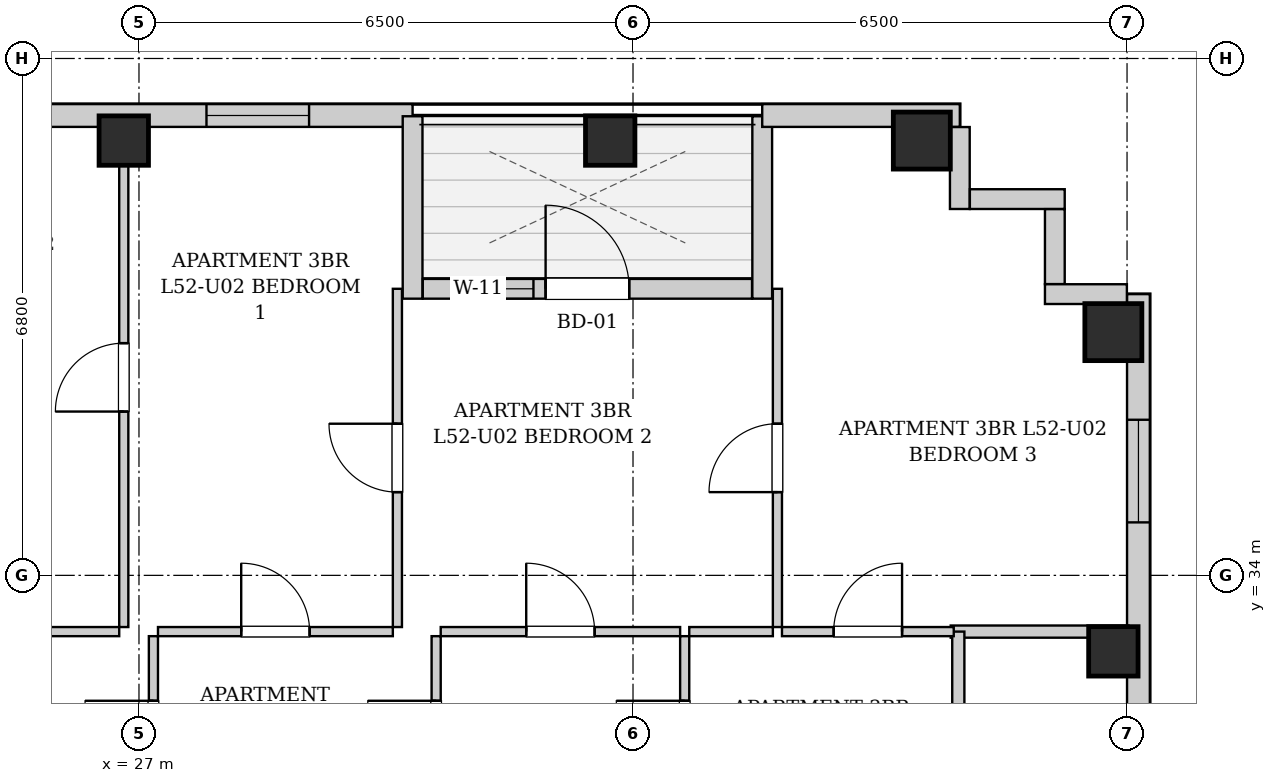
"""IFC4 building model, lengths in metres.
Left out: names, types, materials, properties, quantities, classifications, styles, units other than length and angle.
Written with IfcOpenShell. Run it as: python <this file> out.ifc"""

import sys

from ifc_helpers import new_model, si_unit, direction, frame, frame_2d, origin, origin_2d, place, context, subcontext, project, spatial, rectangle, extrude, element, fill, save


model = new_model("IFC4")
c1 = context("Model", 3, precision=1e-05, world=origin(), true_north=direction((0.0, 1.0)))
c2 = subcontext(c1, "Body", "Model", "MODEL_VIEW")
j1 = project(units=[si_unit("LENGTHUNIT", "METRE"), si_unit("PLANEANGLEUNIT", "RADIAN")], contexts=[c1])
p1 = place(None, origin())
s1 = spatial("IfcSite", under=j1, at=p1, CompositionType="ELEMENT")
p2 = place(p1, origin())
s2 = spatial("IfcBuilding", under=s1, at=p2, CompositionType="ELEMENT")
p3 = place(p2, frame((0.0, 0.0, 181.0)))
s3 = spatial("IfcBuildingStorey", under=s2, at=p3, CompositionType="ELEMENT", Elevation=181.0)
for number, where, z_axis, x_axis in (
    (1, (26.8, 39.72, 0.0), (0.0, 0.0, 1.0), (1.0, 0.0, 0.0)),
    (2, (33.2, 39.72, 0.0), (0.0, 0.0, 1.0), (1.0, 0.0, 0.0)),
):
    element("IfcColumn", number, at=place(p3, frame(where, z_axis=z_axis, x_axis=x_axis)), inside=s3, PredefinedType="COLUMN", context=c2, shape_type="SweptSolid", body=[
        extrude(rectangle(XDim=0.65, YDim=0.65, at=origin_2d()), origin(), (0.0, 0.0, 1.0), 3.3),
    ])
p4 = place(p3, frame((37.3, 39.72, 0.0), z_axis=(0.0, 0.0, 1.0), x_axis=(1.0, 0.0, 0.0)))
e3 = element("IfcColumn", 3, at=p4, inside=s3, PredefinedType="COLUMN", context=c2, shape_type="SweptSolid", body=[
    extrude(rectangle(XDim=0.75, YDim=0.75, at=origin_2d()), origin(), (0.0, 0.0, 1.0), 3.3),
])
p5 = place(p3, frame((39.82, 33.0, 0.0), z_axis=(0.0, 0.0, 1.0), x_axis=(1.0, 0.0, 0.0)))
e4 = element("IfcColumn", 4, at=p5, inside=s3, PredefinedType="COLUMN", context=c2, shape_type="SweptSolid", body=[
    extrude(rectangle(XDim=0.65, YDim=0.65, at=origin_2d()), origin(), (0.0, 0.0, 1.0), 3.3),
])
p6 = place(p3, frame((39.82, 37.2, 0.0), z_axis=(0.0, 0.0, 1.0), x_axis=(1.0, 0.0, 0.0)))
e5 = element("IfcColumn", 5, at=p6, inside=s3, PredefinedType="COLUMN", context=c2, shape_type="SweptSolid", body=[
    extrude(rectangle(XDim=0.75, YDim=0.75, at=origin_2d()), origin(), (0.0, 0.0, 1.0), 3.3),
])
p7 = place(p3, frame((13.1, 40.05, 0.0), z_axis=(0.0, 0.0, 1.0), x_axis=(1.0, 0.0, 0.0)))
e6 = element("IfcWall", 6, at=p7, inside=s3, PredefinedType="SOLIDWALL", context=c2, shape_type="SweptSolid", body=[
    extrude(rectangle(XDim=17.5, YDim=0.3, at=frame_2d((8.75, 0.0))), origin(), (0.0, 0.0, 1.0), 3.04),
])
p8 = place(p7, frame((1.815, 0.0, 0.55)))
e7 = element("IfcOpeningElement", 7, at=p8, cuts=e6, PredefinedType="OPENING", context=c2, shape_type="SweptSolid", body=[
    extrude(rectangle(XDim=1.35, YDim=1.2, at=frame_2d((0.675, 0.6))), frame((0.0, 0.16, 0.0), z_axis=(0.0, -1.0, 0.0), x_axis=(1.0, 0.0, 0.0)), (0.0, 0.0, 1.0), 0.32),
])
p9 = place(p7, frame((6.189, 0.0, 0.55)))
e8 = element("IfcOpeningElement", 8, at=p9, cuts=e6, PredefinedType="OPENING", context=c2, shape_type="SweptSolid", body=[
    extrude(rectangle(XDim=1.35, YDim=1.2, at=frame_2d((0.675, 0.6))), frame((0.0, 0.16, 0.0), z_axis=(0.0, -1.0, 0.0), x_axis=(1.0, 0.0, 0.0)), (0.0, 0.0, 1.0), 0.32),
])
p10 = place(p7, frame((14.788, 0.0, 0.55)))
e9 = element("IfcOpeningElement", 9, at=p10, cuts=e6, PredefinedType="OPENING", context=c2, shape_type="SweptSolid", body=[
    extrude(rectangle(XDim=1.35, YDim=1.2, at=frame_2d((0.675, 0.6))), frame((0.0, 0.16, 0.0), z_axis=(0.0, -1.0, 0.0), x_axis=(1.0, 0.0, 0.0)), (0.0, 0.0, 1.0), 0.32),
])
p11 = place(p3, frame((30.6, 40.04, 0.0), z_axis=(0.0, 0.0, 1.0), x_axis=(0.0, -1.0, 0.0)))
e10 = element("IfcWall", 10, at=p11, inside=s3, PredefinedType="SOLIDWALL", context=c2, shape_type="SweptSolid", body=[
    extrude(rectangle(XDim=2.4, YDim=0.26, at=frame_2d((1.2, 0.0))), origin(), (0.0, 0.0, 1.0), 3.04),
])
p12 = place(p3, frame((30.734, 37.77, 0.0), z_axis=(0.0, 0.0, 1.0), x_axis=(1.0, 0.0, 0.0)))
e11 = element("IfcWall", 11, at=p12, inside=s3, PredefinedType="SOLIDWALL", context=c2, shape_type="SweptSolid", body=[
    extrude(rectangle(XDim=4.332, YDim=0.26, at=frame_2d((2.166, 0.0))), origin(), (0.0, 0.0, 1.0), 3.04),
])
p13 = place(p12, frame((1.616, 0.0, 0.0)))
e12 = element("IfcOpeningElement", 12, at=p13, cuts=e11, PredefinedType="OPENING", context=c2, shape_type="SweptSolid", body=[
    extrude(rectangle(XDim=1.1, YDim=2.0, at=frame_2d((0.55, 1.0))), frame((0.0, 0.14, 0.0), z_axis=(0.0, -1.0, 0.0), x_axis=(1.0, 0.0, 0.0)), (0.0, 0.0, 1.0), 0.28),
])
p14 = place(p12, frame((0.606, 0.0, 0.55)))
e13 = element("IfcOpeningElement", 13, at=p14, cuts=e11, PredefinedType="OPENING", context=c2, shape_type="SweptSolid", body=[
    extrude(rectangle(XDim=0.85, YDim=1.2, at=frame_2d((0.425, 0.6))), frame((0.0, 0.14, 0.0), z_axis=(0.0, -1.0, 0.0), x_axis=(1.0, 0.0, 0.0)), (0.0, 0.0, 1.0), 0.28),
])
p15 = place(p3, frame((35.2, 37.64, 0.0), z_axis=(0.0, 0.0, 1.0), x_axis=(0.0, 1.0, 0.0)))
e14 = element("IfcWall", 14, at=p15, inside=s3, PredefinedType="SOLIDWALL", context=c2, shape_type="SweptSolid", body=[
    extrude(rectangle(XDim=2.4, YDim=0.26, at=frame_2d((1.2, 0.0))), origin(), (0.0, 0.0, 1.0), 3.04),
])
p16 = place(p3, frame((35.2, 40.05, 0.0), z_axis=(0.0, 0.0, 1.0), x_axis=(1.0, 0.0, 0.0)))
e15 = element("IfcWall", 15, at=p16, inside=s3, PredefinedType="SOLIDWALL", context=c2, shape_type="SweptSolid", body=[
    extrude(rectangle(XDim=2.6, YDim=0.3, at=frame_2d((1.3, 0.0))), origin(), (0.0, 0.0, 1.0), 3.04),
])
p17 = place(p3, frame((40.15, 37.7, 0.0), z_axis=(0.0, 0.0, 1.0), x_axis=(0.0, -1.0, 0.0)))
e16 = element("IfcWall", 16, at=p17, inside=s3, PredefinedType="SOLIDWALL", context=c2, shape_type="SweptSolid", body=[
    extrude(rectangle(XDim=31.4, YDim=0.3, at=frame_2d((15.7, 0.0))), origin(), (0.0, 0.0, 1.0), 3.04),
])
p18 = place(p17, frame((28.396, 0.0, 0.55)))
e17 = element("IfcOpeningElement", 17, at=p18, cuts=e16, PredefinedType="OPENING", context=c2, shape_type="SweptSolid", body=[
    extrude(rectangle(XDim=1.35, YDim=1.2, at=frame_2d((0.675, 0.6))), frame((0.0, 0.16, 0.0), z_axis=(0.0, -1.0, 0.0), x_axis=(1.0, 0.0, 0.0)), (0.0, 0.0, 1.0), 0.32),
])
p19 = place(p17, frame((1.653, 0.0, 0.55)))
e18 = element("IfcOpeningElement", 18, at=p19, cuts=e16, PredefinedType="OPENING", context=c2, shape_type="SweptSolid", body=[
    extrude(rectangle(XDim=1.35, YDim=1.2, at=frame_2d((0.675, 0.6))), frame((0.0, 0.16, 0.0), z_axis=(0.0, -1.0, 0.0), x_axis=(1.0, 0.0, 0.0)), (0.0, 0.0, 1.0), 0.32),
])
p20 = place(p17, frame((19.683, 0.0, 0.55)))
e19 = element("IfcOpeningElement", 19, at=p20, cuts=e16, PredefinedType="OPENING", context=c2, shape_type="SweptSolid", body=[
    extrude(rectangle(XDim=1.35, YDim=1.2, at=frame_2d((0.675, 0.6))), frame((0.0, 0.16, 0.0), z_axis=(0.0, -1.0, 0.0), x_axis=(1.0, 0.0, 0.0)), (0.0, 0.0, 1.0), 0.32),
])
p21 = place(p17, frame((10.367, 0.0, 0.55)))
e20 = element("IfcOpeningElement", 20, at=p21, cuts=e16, PredefinedType="OPENING", context=c2, shape_type="SweptSolid", body=[
    extrude(rectangle(XDim=1.35, YDim=1.2, at=frame_2d((0.675, 0.6))), frame((0.0, 0.16, 0.0), z_axis=(0.0, -1.0, 0.0), x_axis=(1.0, 0.0, 0.0)), (0.0, 0.0, 1.0), 0.32),
])
p22 = place(p3, frame((37.8, 39.898, 0.0), z_axis=(0.0, 0.0, 1.0), x_axis=(0.0, -1.0, 0.0)))
e21 = element("IfcWall", 21, at=p22, inside=s3, PredefinedType="SOLIDWALL", context=c2, shape_type="SweptSolid", body=[
    extrude(rectangle(XDim=1.078, YDim=0.26, at=frame_2d((0.539, 0.0))), origin(), (0.0, 0.0, 1.0), 3.04),
])
p23 = place(p3, frame((37.932, 38.95, 0.0), z_axis=(0.0, 0.0, 1.0), x_axis=(1.0, 0.0, 0.0)))
e22 = element("IfcWall", 22, at=p23, inside=s3, PredefinedType="SOLIDWALL", context=c2, shape_type="SweptSolid", body=[
    extrude(rectangle(XDim=1.248, YDim=0.26, at=frame_2d((0.624, 0.0))), origin(), (0.0, 0.0, 1.0), 3.04),
])
p24 = place(p3, frame((39.05, 38.818, 0.0), z_axis=(0.0, 0.0, 1.0), x_axis=(0.0, -1.0, 0.0)))
e23 = element("IfcWall", 23, at=p24, inside=s3, PredefinedType="SOLIDWALL", context=c2, shape_type="SweptSolid", body=[
    extrude(rectangle(XDim=0.986, YDim=0.26, at=frame_2d((0.493, 0.0))), origin(), (0.0, 0.0, 1.0), 3.04),
])
p25 = place(p3, frame((38.92, 37.7, 0.0), z_axis=(0.0, 0.0, 1.0), x_axis=(1.0, 0.0, 0.0)))
e24 = element("IfcWall", 24, at=p25, inside=s3, PredefinedType="SOLIDWALL", context=c2, shape_type="SweptSolid", body=[
    extrude(rectangle(XDim=1.078, YDim=0.26, at=frame_2d((0.539, 0.0))), origin(), (0.0, 0.0, 1.0), 3.04),
])
p26 = place(p3, frame((37.68, 33.26, 0.0), z_axis=(0.0, 0.0, 1.0), x_axis=(1.0, 0.0, 0.0)))
e25 = element("IfcWall", 25, at=p26, inside=s3, PredefinedType="PARTITIONING", context=c2, shape_type="SweptSolid", body=[
    extrude(rectangle(XDim=2.34, YDim=0.16, at=frame_2d((1.17, 0.0))), origin(), (0.0, 0.0, 1.0), 3.04),
])
p27 = place(p3, frame((37.78, 30.6, 0.0), z_axis=(0.0, 0.0, 1.0), x_axis=(0.0, 1.0, 0.0)))
e26 = element("IfcWall", 26, at=p27, inside=s3, PredefinedType="PARTITIONING", context=c2, shape_type="SweptSolid", body=[
    extrude(rectangle(XDim=2.66, YDim=0.16, at=frame_2d((1.33, 0.0))), origin(), (0.0, 0.0, 1.0), 3.04),
])
p28 = place(p3, frame((27.19, 30.6, 0.0), z_axis=(0.0, 0.0, 1.0), x_axis=(0.0, 1.0, 0.0)))
e27 = element("IfcWall", 27, at=p28, inside=s3, PredefinedType="PARTITIONING", context=c2, shape_type="SweptSolid", body=[
    extrude(rectangle(XDim=2.6, YDim=0.12, at=frame_2d((1.3, 0.0))), origin(), (0.0, 0.0, 1.0), 3.04),
])
p29 = place(p28, frame((0.85, 0.0, 0.0)))
e28 = element("IfcOpeningElement", 28, at=p29, cuts=e27, PredefinedType="OPENING", context=c2, shape_type="SweptSolid", body=[
    extrude(rectangle(XDim=0.9, YDim=2.05, at=frame_2d((0.45, 1.025))), frame((0.0, 0.07, 0.0), z_axis=(0.0, -1.0, 0.0), x_axis=(1.0, 0.0, 0.0)), (0.0, 0.0, 1.0), 0.14),
])
p30 = place(p3, frame((23.98, 33.26, 0.0), z_axis=(0.0, 0.0, 1.0), x_axis=(1.0, 0.0, 0.0)))
e29 = element("IfcWall", 29, at=p30, inside=s3, PredefinedType="PARTITIONING", context=c2, shape_type="SweptSolid", body=[
    extrude(rectangle(XDim=2.76, YDim=0.12, at=frame_2d((1.38, 0.0))), origin(), (0.0, 0.0, 1.0), 3.04),
])
p31 = place(p30, frame((0.93, 0.0, 0.0)))
e30 = element("IfcOpeningElement", 30, at=p31, cuts=e29, PredefinedType="OPENING", context=c2, shape_type="SweptSolid", body=[
    extrude(rectangle(XDim=0.9, YDim=2.05, at=frame_2d((0.45, 1.025))), frame((0.0, 0.07, 0.0), z_axis=(0.0, -1.0, 0.0), x_axis=(1.0, 0.0, 0.0)), (0.0, 0.0, 1.0), 0.14),
])
p32 = place(p3, frame((30.91, 30.6, 0.0), z_axis=(0.0, 0.0, 1.0), x_axis=(0.0, 1.0, 0.0)))
e31 = element("IfcWall", 31, at=p32, inside=s3, PredefinedType="PARTITIONING", context=c2, shape_type="SweptSolid", body=[
    extrude(rectangle(XDim=2.6, YDim=0.12, at=frame_2d((1.3, 0.0))), origin(), (0.0, 0.0, 1.0), 3.04),
])
p33 = place(p32, frame((0.85, 0.0, 0.0)))
e32 = element("IfcOpeningElement", 32, at=p33, cuts=e31, PredefinedType="OPENING", context=c2, shape_type="SweptSolid", body=[
    extrude(rectangle(XDim=0.9, YDim=2.05, at=frame_2d((0.45, 1.025))), frame((0.0, 0.07, 0.0), z_axis=(0.0, -1.0, 0.0), x_axis=(1.0, 0.0, 0.0)), (0.0, 0.0, 1.0), 0.14),
])
p34 = place(p3, frame((27.25, 33.26, 0.0), z_axis=(0.0, 0.0, 1.0), x_axis=(1.0, 0.0, 0.0)))
e33 = element("IfcWall", 33, at=p34, inside=s3, PredefinedType="PARTITIONING", context=c2, shape_type="SweptSolid", body=[
    extrude(rectangle(XDim=3.09, YDim=0.12, at=frame_2d((1.545, 0.0))), origin(), (0.0, 0.0, 1.0), 3.04),
])
p35 = place(p34, frame((1.095, 0.0, 0.0)))
e34 = element("IfcOpeningElement", 34, at=p35, cuts=e33, PredefinedType="OPENING", context=c2, shape_type="SweptSolid", body=[
    extrude(rectangle(XDim=0.9, YDim=2.05, at=frame_2d((0.45, 1.025))), frame((0.0, 0.07, 0.0), z_axis=(0.0, -1.0, 0.0), x_axis=(1.0, 0.0, 0.0)), (0.0, 0.0, 1.0), 0.14),
])
p36 = place(p3, frame((34.18, 30.6, 0.0), z_axis=(0.0, 0.0, 1.0), x_axis=(0.0, 1.0, 0.0)))
e35 = element("IfcWall", 35, at=p36, inside=s3, PredefinedType="PARTITIONING", context=c2, shape_type="SweptSolid", body=[
    extrude(rectangle(XDim=2.6, YDim=0.12, at=frame_2d((1.3, 0.0))), origin(), (0.0, 0.0, 1.0), 3.04),
])
p37 = place(p36, frame((0.85, 0.0, 0.0)))
e36 = element("IfcOpeningElement", 36, at=p37, cuts=e35, PredefinedType="OPENING", context=c2, shape_type="SweptSolid", body=[
    extrude(rectangle(XDim=0.9, YDim=2.05, at=frame_2d((0.45, 1.025))), frame((0.0, 0.07, 0.0), z_axis=(0.0, -1.0, 0.0), x_axis=(1.0, 0.0, 0.0)), (0.0, 0.0, 1.0), 0.14),
])
p38 = place(p3, frame((30.97, 33.26, 0.0), z_axis=(0.0, 0.0, 1.0), x_axis=(1.0, 0.0, 0.0)))
e37 = element("IfcWall", 37, at=p38, inside=s3, PredefinedType="PARTITIONING", context=c2, shape_type="SweptSolid", body=[
    extrude(rectangle(XDim=3.15, YDim=0.12, at=frame_2d((1.575, 0.0))), origin(), (0.0, 0.0, 1.0), 3.04),
])
p39 = place(p38, frame((1.125, 0.0, 0.0)))
e38 = element("IfcOpeningElement", 38, at=p39, cuts=e37, PredefinedType="OPENING", context=c2, shape_type="SweptSolid", body=[
    extrude(rectangle(XDim=0.9, YDim=2.05, at=frame_2d((0.45, 1.025))), frame((0.0, 0.07, 0.0), z_axis=(0.0, -1.0, 0.0), x_axis=(1.0, 0.0, 0.0)), (0.0, 0.0, 1.0), 0.14),
])
p40 = place(p3, frame((34.24, 33.26, 0.0), z_axis=(0.0, 0.0, 1.0), x_axis=(1.0, 0.0, 0.0)))
e39 = element("IfcWall", 39, at=p40, inside=s3, PredefinedType="PARTITIONING", context=c2, shape_type="SweptSolid", body=[
    extrude(rectangle(XDim=1.1, YDim=0.12, at=frame_2d((0.55, 0.0))), origin(), (0.0, 0.0, 1.0), 3.04),
])
p41 = place(p3, frame((35.46, 33.26, 0.0), z_axis=(0.0, 0.0, 1.0), x_axis=(1.0, 0.0, 0.0)))
e40 = element("IfcWall", 40, at=p41, inside=s3, PredefinedType="PARTITIONING", context=c2, shape_type="SweptSolid", body=[
    extrude(rectangle(XDim=2.26, YDim=0.12, at=frame_2d((1.13, 0.0))), origin(), (0.0, 0.0, 1.0), 3.04),
])
p42 = place(p41, frame((0.68, 0.0, 0.0)))
e41 = element("IfcOpeningElement", 41, at=p42, cuts=e40, PredefinedType="OPENING", context=c2, shape_type="SweptSolid", body=[
    extrude(rectangle(XDim=0.9, YDim=2.05, at=frame_2d((0.45, 1.025))), frame((0.0, 0.07, 0.0), z_axis=(0.0, -1.0, 0.0), x_axis=(1.0, 0.0, 0.0)), (0.0, 0.0, 1.0), 0.14),
])
p43 = place(p3, frame((26.8, 33.32, 0.0), z_axis=(0.0, 0.0, 1.0), x_axis=(0.0, 1.0, 0.0)))
e42 = element("IfcWall", 42, at=p43, inside=s3, PredefinedType="PARTITIONING", context=c2, shape_type="SweptSolid", body=[
    extrude(rectangle(XDim=6.6, YDim=0.12, at=frame_2d((3.3, 0.0))), origin(), (0.0, 0.0, 1.0), 3.04),
])
p44 = place(p43, frame((2.835, 0.0, 0.0)))
e43 = element("IfcOpeningElement", 43, at=p44, cuts=e42, PredefinedType="OPENING", context=c2, shape_type="SweptSolid", body=[
    extrude(rectangle(XDim=0.9, YDim=2.05, at=frame_2d((0.45, 1.025))), frame((0.0, 0.07, 0.0), z_axis=(0.0, -1.0, 0.0), x_axis=(1.0, 0.0, 0.0)), (0.0, 0.0, 1.0), 0.14),
])
p45 = place(p3, frame((30.4, 33.32, 0.0), z_axis=(0.0, 0.0, 1.0), x_axis=(0.0, 1.0, 0.0)))
e44 = element("IfcWall", 44, at=p45, inside=s3, PredefinedType="PARTITIONING", context=c2, shape_type="SweptSolid", body=[
    extrude(rectangle(XDim=4.45, YDim=0.12, at=frame_2d((2.225, 0.0))), origin(), (0.0, 0.0, 1.0), 3.04),
])
p46 = place(p45, frame((1.775, 0.0, 0.0)))
e45 = element("IfcOpeningElement", 45, at=p46, cuts=e44, PredefinedType="OPENING", context=c2, shape_type="SweptSolid", body=[
    extrude(rectangle(XDim=0.9, YDim=2.05, at=frame_2d((0.45, 1.025))), frame((0.0, 0.07, 0.0), z_axis=(0.0, -1.0, 0.0), x_axis=(1.0, 0.0, 0.0)), (0.0, 0.0, 1.0), 0.14),
])
p47 = place(p3, frame((35.4, 33.32, 0.0), z_axis=(0.0, 0.0, 1.0), x_axis=(0.0, 1.0, 0.0)))
e46 = element("IfcWall", 46, at=p47, inside=s3, PredefinedType="PARTITIONING", context=c2, shape_type="SweptSolid", body=[
    extrude(rectangle(XDim=4.45, YDim=0.12, at=frame_2d((2.225, 0.0))), origin(), (0.0, 0.0, 1.0), 3.04),
])
p48 = place(p47, frame((1.775, 0.0, 0.0)))
e47 = element("IfcOpeningElement", 47, at=p48, cuts=e46, PredefinedType="OPENING", context=c2, shape_type="SweptSolid", body=[
    extrude(rectangle(XDim=0.9, YDim=2.05, at=frame_2d((0.45, 1.025))), frame((0.0, 0.07, 0.0), z_axis=(0.0, -1.0, 0.0), x_axis=(1.0, 0.0, 0.0)), (0.0, 0.0, 1.0), 0.14),
])
p49 = place(p29, origin())
e48 = element("IfcDoor", 48, at=p49, inside=s3, OperationType="SINGLE_SWING_RIGHT", PredefinedType="DOOR", context=c2, shape_type="SweptSolid", body=[
    extrude(rectangle(XDim=0.9, YDim=2.05, at=frame_2d((0.45, 1.025))), frame((0.0, 0.025, 0.0), z_axis=(0.0, -1.0, 0.0), x_axis=(1.0, 0.0, 0.0)), (0.0, 0.0, 1.0), 0.05),
])
fill(e28, e48)
p50 = place(p33, origin())
e49 = element("IfcDoor", 49, at=p50, inside=s3, OperationType="SINGLE_SWING_RIGHT", PredefinedType="DOOR", context=c2, shape_type="SweptSolid", body=[
    extrude(rectangle(XDim=0.9, YDim=2.05, at=frame_2d((0.45, 1.025))), frame((0.0, 0.025, 0.0), z_axis=(0.0, -1.0, 0.0), x_axis=(1.0, 0.0, 0.0)), (0.0, 0.0, 1.0), 0.05),
])
fill(e32, e49)
p51 = place(p35, origin())
e50 = element("IfcDoor", 50, at=p51, inside=s3, OperationType="SINGLE_SWING_LEFT", PredefinedType="DOOR", context=c2, shape_type="SweptSolid", body=[
    extrude(rectangle(XDim=0.9, YDim=2.05, at=frame_2d((0.45, 1.025))), frame((0.0, 0.025, 0.0), z_axis=(0.0, -1.0, 0.0), x_axis=(1.0, 0.0, 0.0)), (0.0, 0.0, 1.0), 0.05),
])
fill(e34, e50)
p52 = place(p37, origin())
e51 = element("IfcDoor", 51, at=p52, inside=s3, OperationType="SINGLE_SWING_RIGHT", PredefinedType="DOOR", context=c2, shape_type="SweptSolid", body=[
    extrude(rectangle(XDim=0.9, YDim=2.05, at=frame_2d((0.45, 1.025))), frame((0.0, 0.025, 0.0), z_axis=(0.0, -1.0, 0.0), x_axis=(1.0, 0.0, 0.0)), (0.0, 0.0, 1.0), 0.05),
])
fill(e36, e51)
p53 = place(p39, origin())
e52 = element("IfcDoor", 52, at=p53, inside=s3, OperationType="SINGLE_SWING_LEFT", PredefinedType="DOOR", context=c2, shape_type="SweptSolid", body=[
    extrude(rectangle(XDim=0.9, YDim=2.05, at=frame_2d((0.45, 1.025))), frame((0.0, 0.025, 0.0), z_axis=(0.0, -1.0, 0.0), x_axis=(1.0, 0.0, 0.0)), (0.0, 0.0, 1.0), 0.05),
])
fill(e38, e52)
p54 = place(p42, origin())
e53 = element("IfcDoor", 53, at=p54, inside=s3, OperationType="SINGLE_SWING_RIGHT", PredefinedType="DOOR", context=c2, shape_type="SweptSolid", body=[
    extrude(rectangle(XDim=0.9, YDim=2.05, at=frame_2d((0.45, 1.025))), frame((0.0, 0.025, 0.0), z_axis=(0.0, -1.0, 0.0), x_axis=(1.0, 0.0, 0.0)), (0.0, 0.0, 1.0), 0.05),
])
fill(e41, e53)
p55 = place(p44, origin())
e54 = element("IfcDoor", 54, at=p55, inside=s3, OperationType="SINGLE_SWING_LEFT", PredefinedType="DOOR", context=c2, shape_type="SweptSolid", body=[
    extrude(rectangle(XDim=0.9, YDim=2.05, at=frame_2d((0.45, 1.025))), frame((0.0, 0.025, 0.0), z_axis=(0.0, -1.0, 0.0), x_axis=(1.0, 0.0, 0.0)), (0.0, 0.0, 1.0), 0.05),
])
fill(e43, e54)
p56 = place(p46, origin())
e55 = element("IfcDoor", 55, at=p56, inside=s3, OperationType="SINGLE_SWING_RIGHT", PredefinedType="DOOR", context=c2, shape_type="SweptSolid", body=[
    extrude(rectangle(XDim=0.9, YDim=2.05, at=frame_2d((0.45, 1.025))), frame((0.0, 0.025, 0.0), z_axis=(0.0, -1.0, 0.0), x_axis=(1.0, 0.0, 0.0)), (0.0, 0.0, 1.0), 0.05),
])
fill(e45, e55)
p57 = place(p48, origin())
e56 = element("IfcDoor", 56, at=p57, inside=s3, OperationType="SINGLE_SWING_LEFT", PredefinedType="DOOR", context=c2, shape_type="SweptSolid", body=[
    extrude(rectangle(XDim=0.9, YDim=2.05, at=frame_2d((0.45, 1.025))), frame((0.0, 0.025, 0.0), z_axis=(0.0, -1.0, 0.0), x_axis=(1.0, 0.0, 0.0)), (0.0, 0.0, 1.0), 0.05),
])
fill(e47, e56)
p58 = place(p13, origin())
e57 = element("IfcDoor", 57, at=p58, inside=s3, OperationType="SINGLE_SWING_LEFT", PredefinedType="DOOR", context=c2, shape_type="SweptSolid", body=[
    extrude(rectangle(XDim=1.1, YDim=2.0, at=frame_2d((0.55, 1.0))), frame((0.0, 0.025, 0.0), z_axis=(0.0, -1.0, 0.0), x_axis=(1.0, 0.0, 0.0)), (0.0, 0.0, 1.0), 0.05),
])
fill(e12, e57)
p59 = place(p10, origin())
e58 = element("IfcWindow", 58, at=p59, inside=s3, PartitioningType="SINGLE_PANEL", PredefinedType="WINDOW", context=c2, shape_type="SweptSolid", body=[
    extrude(rectangle(XDim=1.35, YDim=1.2, at=frame_2d((0.675, 0.6))), frame((0.0, 0.03, 0.0), z_axis=(0.0, -1.0, 0.0), x_axis=(1.0, 0.0, 0.0)), (0.0, 0.0, 1.0), 0.06),
])
fill(e9, e58)
p60 = place(p14, origin())
e59 = element("IfcWindow", 59, at=p60, inside=s3, PartitioningType="SINGLE_PANEL", PredefinedType="WINDOW", context=c2, shape_type="SweptSolid", body=[
    extrude(rectangle(XDim=0.85, YDim=1.2, at=frame_2d((0.425, 0.6))), frame((0.0, 0.03, 0.0), z_axis=(0.0, -1.0, 0.0), x_axis=(1.0, 0.0, 0.0)), (0.0, 0.0, 1.0), 0.06),
])
fill(e13, e59)
p61 = place(p19, origin())
e60 = element("IfcWindow", 60, at=p61, inside=s3, PartitioningType="SINGLE_PANEL", PredefinedType="WINDOW", context=c2, shape_type="SweptSolid", body=[
    extrude(rectangle(XDim=1.35, YDim=1.2, at=frame_2d((0.675, 0.6))), frame((0.0, 0.03, 0.0), z_axis=(0.0, -1.0, 0.0), x_axis=(1.0, 0.0, 0.0)), (0.0, 0.0, 1.0), 0.06),
])
fill(e18, e60)
save(model, sys.argv[1])
